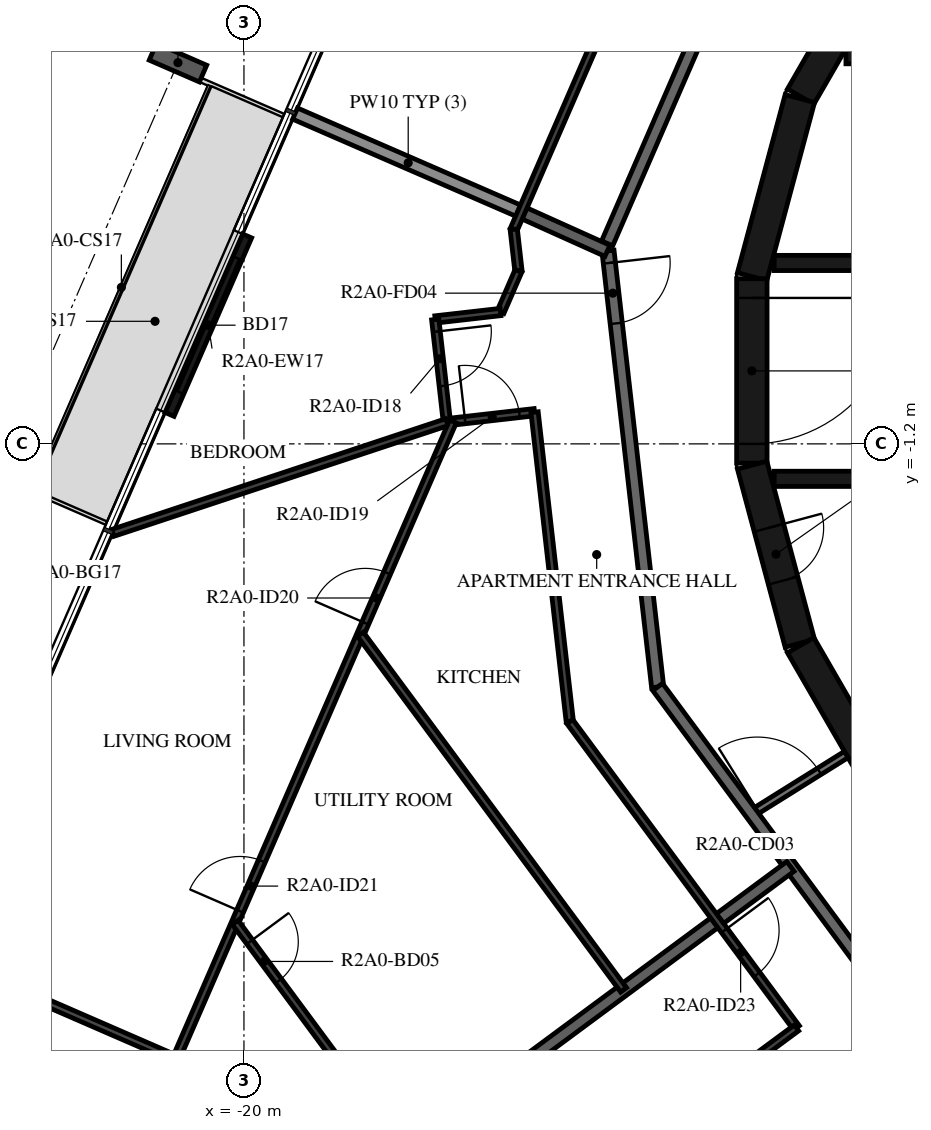
"""IFC4 building model, lengths in metres.
Left out: names, types, materials, properties, quantities, classifications, styles, units other than length and angle.
Written with IfcOpenShell. Run it as: python <this file> out.ifc"""

import sys

from ifc_helpers import new_model, si_unit, direction, frame, frame_2d, origin, origin_2d, place, context, subcontext, project, spatial, rectangle, i_section, extrude, element, fill, save


model = new_model("IFC4")
c1 = context("Model", 3, precision=1e-05, world=origin(), true_north=direction((0.0, 1.0)))
c2 = subcontext(c1, "Body", "Model", "MODEL_VIEW")
j1 = project(units=[si_unit("LENGTHUNIT", "METRE"), si_unit("PLANEANGLEUNIT", "RADIAN")], contexts=[c1])
p1 = place(None, origin())
s1 = spatial("IfcSite", under=j1, at=p1, CompositionType="ELEMENT")
p2 = place(p1, origin())
s2 = spatial("IfcBuilding", under=s1, at=p2, CompositionType="ELEMENT")
p3 = place(p2, frame((0.0, 0.0, 83.7)))
s3 = spatial("IfcBuildingStorey", under=s2, at=p3, CompositionType="ELEMENT", Elevation=83.7)
p4 = place(p3, frame((-21.085, 5.069, -0.38), z_axis=(0.0, 0.0, 1.0), x_axis=(0.398749038162, 0.917060087761, 0.0)))
e1 = element("IfcColumn", 1, at=p4, inside=s3, PredefinedType="COLUMN", context=c2, shape_type="SweptSolid", body=[
    extrude(i_section(OverallWidth=0.3, OverallDepth=0.9, WebThickness=0.019, FlangeThickness=0.035, FilletRadius=0.03, at=origin_2d()), origin(), (0.0, 0.0, 1.0), 3.5),
])
p5 = place(p3, frame((-19.947, 2.219, 0.0), z_axis=(0.0, 0.0, 1.0), x_axis=(-0.398784695066, -0.917044582876, 0.0)))
e2 = element("IfcWall", 2, at=p5, inside=s3, PredefinedType="STANDARD", context=c2, shape_type="SweptSolid", body=[
    extrude(rectangle(XDim=3.2, YDim=0.16, at=frame_2d((1.6, 0.0))), origin(), (0.0, 0.0, 1.0), 3.12),
])
p6 = place(p5, frame((0.4, 0.0, 0.0)))
e3 = element("IfcOpeningElement", 3, at=p6, cuts=e2, PredefinedType="OPENING", context=c2, shape_type="SweptSolid", body=[
    extrude(rectangle(XDim=2.4, YDim=2.4, at=frame_2d((1.2, 1.2))), frame((0.0, 0.09, 0.0), z_axis=(0.0, -1.0, 0.0), x_axis=(1.0, 0.0, 0.0)), (0.0, 0.0, 1.0), 0.18),
])
for number, where, z_axis, x_axis in (
    (4, (-9.329, 7.137, 0.0), (0.0, 0.0, 1.0), (-0.5, -0.866, 0.0)),
    (5, (-10.858, 4.479, 0.0), (0.0, 0.0, 1.0), (-0.259, -0.966, 0.0)),
):
    element("IfcWall", number, at=place(p3, frame(where, z_axis=z_axis, x_axis=x_axis)), inside=s3, PredefinedType="SHEAR", context=c2, shape_type="SweptSolid", body=[
        extrude(rectangle(XDim=3.033, YDim=0.5, at=frame_2d((1.516, 0.0))), origin(), (0.0, 0.0, 1.0), 3.12),
    ])
p7 = place(p3, frame((-11.647, 1.516, 0.0), z_axis=(0.0, 0.0, 1.0), x_axis=(0.0, -1.0, 0.0)))
e6 = element("IfcWall", 6, at=p7, inside=s3, PredefinedType="SHEAR", context=c2, shape_type="SweptSolid", body=[
    extrude(rectangle(XDim=3.033, YDim=0.5, at=frame_2d((1.516, 0.0))), origin(), (0.0, 0.0, 1.0), 3.12),
])
p8 = place(p7, frame((0.316, 0.0, 0.0)))
e7 = element("IfcOpeningElement", 7, at=p8, cuts=e6, PredefinedType="OPENING", context=c2, shape_type="SweptSolid", body=[
    extrude(rectangle(XDim=2.4, YDim=2.1, at=frame_2d((1.2, 1.05))), frame((0.0, 0.26, 0.0), z_axis=(0.0, -1.0, 0.0), x_axis=(1.0, 0.0, 0.0)), (0.0, 0.0, 1.0), 0.52),
])
p9 = place(p3, frame((-11.643, -1.55, 0.0), z_axis=(0.0, 0.0, 1.0), x_axis=(0.258734743916, -0.965948410781, 0.0)))
e8 = element("IfcWall", 8, at=p9, inside=s3, PredefinedType="SHEAR", context=c2, shape_type="SweptSolid", body=[
    extrude(rectangle(XDim=3.033, YDim=0.5, at=frame_2d((1.516, 0.0))), origin(), (0.0, 0.0, 1.0), 3.12),
])
p10 = place(p9, frame((1.066, 0.0, 0.0)))
e9 = element("IfcOpeningElement", 9, at=p10, cuts=e8, PredefinedType="OPENING", context=c2, shape_type="SweptSolid", body=[
    extrude(rectangle(XDim=0.9, YDim=2.1, at=frame_2d((0.45, 1.05))), frame((0.0, 0.26, 0.0), z_axis=(0.0, -1.0, 0.0), x_axis=(1.0, 0.0, 0.0)), (0.0, 0.0, 1.0), 0.52),
])
p11 = place(p3, frame((-10.845, -4.51, 0.0), z_axis=(0.0, 0.0, 1.0), x_axis=(0.500087131594, -0.865975092491, 0.0)))
e10 = element("IfcWall", 10, at=p11, inside=s3, PredefinedType="SHEAR", context=c2, shape_type="SweptSolid", body=[
    extrude(rectangle(XDim=3.033, YDim=0.5, at=frame_2d((1.516, 0.0))), origin(), (0.0, 0.0, 1.0), 3.12),
])
p12 = place(p3, frame((-7.0, 5.175, 0.0), z_axis=(0.0, 0.0, 1.0), x_axis=(-1.0, 0.0, 0.0)))
e11 = element("IfcWall", 11, at=p12, inside=s3, PredefinedType="SHEAR", context=c2, shape_type="SweptSolid", body=[
    extrude(rectangle(XDim=3.1, YDim=0.25, at=frame_2d((1.55, 0.0))), origin(), (0.0, 0.0, 1.0), 3.12),
])
p13 = place(p3, frame((-11.28, 1.775, 0.0), z_axis=(0.0, 0.0, 1.0), x_axis=(1.0, 0.0, 0.0)))
e12 = element("IfcWall", 12, at=p13, inside=s3, PredefinedType="SHEAR", context=c2, shape_type="SweptSolid", body=[
    extrude(rectangle(XDim=14.38, YDim=0.25, at=frame_2d((7.19, 0.0))), origin(), (0.0, 0.0, 1.0), 3.12),
])
p14 = place(p13, frame((2.13, 0.0, 0.0)))
e13 = element("IfcOpeningElement", 13, at=p14, cuts=e12, PredefinedType="OPENING", context=c2, shape_type="SweptSolid", body=[
    extrude(rectangle(XDim=1.1, YDim=2.1, at=frame_2d((0.55, 1.05))), frame((0.0, 0.135, 0.0), z_axis=(0.0, -1.0, 0.0), x_axis=(1.0, 0.0, 0.0)), (0.0, 0.0, 1.0), 0.27),
])
p15 = place(p13, frame((4.28, 0.0, 0.0)))
e14 = element("IfcOpeningElement", 14, at=p15, cuts=e12, PredefinedType="OPENING", context=c2, shape_type="SweptSolid", body=[
    extrude(rectangle(XDim=1.1, YDim=2.1, at=frame_2d((0.55, 1.05))), frame((0.0, 0.135, 0.0), z_axis=(0.0, -1.0, 0.0), x_axis=(1.0, 0.0, 0.0)), (0.0, 0.0, 1.0), 0.27),
])
p16 = place(p13, frame((6.43, 0.0, 0.0)))
e15 = element("IfcOpeningElement", 15, at=p16, cuts=e12, PredefinedType="OPENING", context=c2, shape_type="SweptSolid", body=[
    extrude(rectangle(XDim=1.1, YDim=2.1, at=frame_2d((0.55, 1.05))), frame((0.0, 0.135, 0.0), z_axis=(0.0, -1.0, 0.0), x_axis=(1.0, 0.0, 0.0)), (0.0, 0.0, 1.0), 0.27),
])
p17 = place(p13, frame((8.58, 0.0, 0.0)))
e16 = element("IfcOpeningElement", 16, at=p17, cuts=e12, PredefinedType="OPENING", context=c2, shape_type="SweptSolid", body=[
    extrude(rectangle(XDim=1.1, YDim=2.1, at=frame_2d((0.55, 1.05))), frame((0.0, 0.135, 0.0), z_axis=(0.0, -1.0, 0.0), x_axis=(1.0, 0.0, 0.0)), (0.0, 0.0, 1.0), 0.27),
])
p18 = place(p13, frame((11.905, 0.0, 0.0)))
e17 = element("IfcOpeningElement", 17, at=p18, cuts=e12, PredefinedType="OPENING", context=c2, shape_type="SweptSolid", body=[
    extrude(rectangle(XDim=0.9, YDim=2.1, at=frame_2d((0.45, 1.05))), frame((0.0, 0.135, 0.0), z_axis=(0.0, -1.0, 0.0), x_axis=(1.0, 0.0, 0.0)), (0.0, 0.0, 1.0), 0.27),
])
p19 = place(p3, frame((-11.28, -1.775, 0.0), z_axis=(0.0, 0.0, 1.0), x_axis=(1.0, 0.0, 0.0)))
e18 = element("IfcWall", 18, at=p19, inside=s3, PredefinedType="SHEAR", context=c2, shape_type="SweptSolid", body=[
    extrude(rectangle(XDim=14.38, YDim=0.25, at=frame_2d((7.19, 0.0))), origin(), (0.0, 0.0, 1.0), 3.12),
])
p20 = place(p19, frame((7.605, 0.0, 0.0)))
e19 = element("IfcOpeningElement", 19, at=p20, cuts=e18, PredefinedType="OPENING", context=c2, shape_type="SweptSolid", body=[
    extrude(rectangle(XDim=0.9, YDim=2.1, at=frame_2d((0.45, 1.05))), frame((0.0, 0.135, 0.0), z_axis=(0.0, -1.0, 0.0), x_axis=(1.0, 0.0, 0.0)), (0.0, 0.0, 1.0), 0.27),
])
p21 = place(p19, frame((10.83, 0.0, 0.0)))
e20 = element("IfcOpeningElement", 20, at=p21, cuts=e18, PredefinedType="OPENING", context=c2, shape_type="SweptSolid", body=[
    extrude(rectangle(XDim=0.9, YDim=2.1, at=frame_2d((0.45, 1.05))), frame((0.0, 0.135, 0.0), z_axis=(0.0, -1.0, 0.0), x_axis=(1.0, 0.0, 0.0)), (0.0, 0.0, 1.0), 0.27),
])
p22 = place(p19, frame((12.98, 0.0, 0.0)))
e21 = element("IfcOpeningElement", 21, at=p22, cuts=e18, PredefinedType="OPENING", context=c2, shape_type="SweptSolid", body=[
    extrude(rectangle(XDim=0.9, YDim=2.1, at=frame_2d((0.45, 1.05))), frame((0.0, 0.135, 0.0), z_axis=(0.0, -1.0, 0.0), x_axis=(1.0, 0.0, 0.0)), (0.0, 0.0, 1.0), 0.27),
])
p23 = place(p3, frame((-11.654, -7.282, 0.0), z_axis=(0.0, 0.0, 1.0), x_axis=(0.848117698675, 0.529807860638, 0.0)))
e22 = element("IfcWall", 22, at=p23, inside=s3, PredefinedType="PARTITIONING", context=c2, shape_type="SweptSolid", body=[
    extrude(rectangle(XDim=1.838, YDim=0.12, at=frame_2d((0.919, 0.0))), origin(), (0.0, 0.0, 1.0), 3.12),
])
p24 = place(p23, frame((0.115, 0.0, 0.0)))
e23 = element("IfcOpeningElement", 23, at=p24, cuts=e22, PredefinedType="OPENING", context=c2, shape_type="SweptSolid", body=[
    extrude(rectangle(XDim=1.2, YDim=2.1, at=frame_2d((0.6, 1.05))), frame((0.0, 0.07, 0.0), z_axis=(0.0, -1.0, 0.0), x_axis=(1.0, 0.0, 0.0)), (0.0, 0.0, 1.0), 0.14),
])
p25 = place(p3, frame((-11.1, 8.829, 0.0), z_axis=(0.0, 0.0, 1.0), x_axis=(-0.398741918631, -0.917063183388, 0.0)))
e24 = element("IfcWall", 24, at=p25, inside=s3, PredefinedType="STANDARD", context=c2, shape_type="SweptSolid", body=[
    extrude(rectangle(XDim=7.342, YDim=0.2, at=frame_2d((3.671, 0.0))), origin(), (0.0, 0.0, 1.0), 3.12),
])
p26 = place(p3, frame((-14.013, 1.974, 0.0), z_axis=(0.0, 0.0, 1.0), x_axis=(0.113196526349, -0.993572617589, 0.0)))
e25 = element("IfcWall", 25, at=p26, inside=s3, PredefinedType="STANDARD", context=c2, shape_type="SweptSolid", body=[
    extrude(rectangle(XDim=7.219, YDim=0.2, at=frame_2d((3.609, 0.0))), origin(), (0.0, 0.0, 1.0), 3.12),
])
p27 = place(p26, frame((0.2, 0.0, 0.0)))
e26 = element("IfcOpeningElement", 26, at=p27, cuts=e25, PredefinedType="OPENING", context=c2, shape_type="SweptSolid", body=[
    extrude(rectangle(XDim=1.0, YDim=2.1, at=frame_2d((0.5, 1.05))), frame((0.0, 0.11, 0.0), z_axis=(0.0, -1.0, 0.0), x_axis=(1.0, 0.0, 0.0)), (0.0, 0.0, 1.0), 0.22),
])
p28 = place(p3, frame((-13.196, -5.198, 0.0), z_axis=(0.0, 0.0, 1.0), x_axis=(0.594805187394, -0.803869883159, 0.0)))
e27 = element("IfcWall", 27, at=p28, inside=s3, PredefinedType="STANDARD", context=c2, shape_type="SweptSolid", body=[
    extrude(rectangle(XDim=7.342, YDim=0.2, at=frame_2d((3.671, 0.0))), origin(), (0.0, 0.0, 1.0), 3.12),
])
p29 = place(p3, frame((-15.439, 2.613, 0.0), z_axis=(0.0, 0.0, 1.0), x_axis=(0.911830308819, -0.410567275752, 0.0)))
e28 = element("IfcWall", 28, at=p29, inside=s3, PredefinedType="STANDARD", context=c2, shape_type="SweptSolid", body=[
    extrude(rectangle(XDim=1.553, YDim=0.2, at=frame_2d((0.777, 0.0))), origin(), (0.0, 0.0, 1.0), 3.12),
])
p30 = place(p3, frame((-19.159, 4.231, 0.0), z_axis=(0.0, 0.0, 1.0), x_axis=(0.91704996524, -0.398772317562, 0.0)))
e29 = element("IfcWall", 29, at=p30, inside=s3, PredefinedType="STANDARD", context=c2, shape_type="SweptSolid", body=[
    extrude(rectangle(XDim=4.057, YDim=0.2, at=frame_2d((2.029, 0.0))), origin(), (0.0, 0.0, 1.0), 2.73),
])
p31 = place(p3, frame((-15.41, -11.403, 0.0), z_axis=(0.0, 0.0, 1.0), x_axis=(0.803887568227, 0.594781285558, 0.0)))
e30 = element("IfcWall", 30, at=p31, inside=s3, PredefinedType="STANDARD", context=c2, shape_type="SweptSolid", body=[
    extrude(rectangle(XDim=5.47, YDim=0.2, at=frame_2d((2.735, 0.0))), origin(), (0.0, 0.0, 1.0), 3.12),
])
p32 = place(p3, frame((-14.049, 5.81, 0.0), z_axis=(0.0, 0.0, 1.0), x_axis=(-0.398707311688, -0.917078229818, 0.0)))
e31 = element("IfcWall", 31, at=p32, inside=s3, PredefinedType="PARTITIONING", context=c2, shape_type="SweptSolid", body=[
    extrude(rectangle(XDim=3.799, YDim=0.12, at=frame_2d((1.899, 0.0))), origin(), (0.0, 0.0, 1.0), 3.12),
])
p33 = place(p3, frame((-15.563, 2.326, 0.0), z_axis=(0.0, 0.0, 1.0), x_axis=(0.113013677091, -0.993593432341, 0.0)))
e32 = element("IfcWall", 32, at=p33, inside=s3, PredefinedType="PARTITIONING", context=c2, shape_type="SweptSolid", body=[
    extrude(rectangle(XDim=0.685, YDim=0.12, at=frame_2d((0.342, 0.0))), origin(), (0.0, 0.0, 1.0), 3.12),
])
p34 = place(p3, frame((-15.486, 1.646, 0.0), z_axis=(0.0, 0.0, 1.0), x_axis=(-0.398701933952, -0.917080567814, 0.0)))
e33 = element("IfcWall", 33, at=p34, inside=s3, PredefinedType="PARTITIONING", context=c2, shape_type="SweptSolid", body=[
    extrude(rectangle(XDim=0.739, YDim=0.12, at=frame_2d((0.369, 0.0))), origin(), (0.0, 0.0, 1.0), 3.12),
])
p35 = place(p3, frame((-15.78, 0.968, 0.0), z_axis=(0.0, 0.0, 1.0), x_axis=(-0.99355448905, -0.113355534887, 0.0)))
e34 = element("IfcWall", 34, at=p35, inside=s3, PredefinedType="PARTITIONING", context=c2, shape_type="SweptSolid", body=[
    extrude(rectangle(XDim=1.081, YDim=0.12, at=frame_2d((0.541, 0.0))), origin(), (0.0, 0.0, 1.0), 3.12),
])
p36 = place(p3, frame((-16.854, 0.846, 0.0), z_axis=(0.0, 0.0, 1.0), x_axis=(0.113173930474, -0.993575191649, 0.0)))
e35 = element("IfcWall", 35, at=p36, inside=s3, PredefinedType="PARTITIONING", context=c2, shape_type="SweptSolid", body=[
    extrude(rectangle(XDim=1.7, YDim=0.12, at=frame_2d((0.85, 0.0))), origin(), (0.0, 0.0, 1.0), 3.12),
])
p37 = place(p36, frame((0.2, 0.0, 0.0)))
e36 = element("IfcOpeningElement", 36, at=p37, cuts=e35, PredefinedType="OPENING", context=c2, shape_type="SweptSolid", body=[
    extrude(rectangle(XDim=0.9, YDim=2.1, at=frame_2d((0.45, 1.05))), frame((0.0, 0.07, 0.0), z_axis=(0.0, -1.0, 0.0), x_axis=(1.0, 0.0, 0.0)), (0.0, 0.0, 1.0), 0.14),
])
p38 = place(p3, frame((-16.563, -0.832, 0.0), z_axis=(0.0, 0.0, 1.0), x_axis=(0.993578035261, 0.113148963084, 0.0)))
e37 = element("IfcWall", 37, at=p38, inside=s3, PredefinedType="PARTITIONING", context=c2, shape_type="SweptSolid", body=[
    extrude(rectangle(XDim=1.351, YDim=0.12, at=frame_2d((0.675, 0.0))), origin(), (0.0, 0.0, 1.0), 3.12),
])
p39 = place(p38, frame((0.2, 0.0, 0.0)))
e38 = element("IfcOpeningElement", 38, at=p39, cuts=e37, PredefinedType="OPENING", context=c2, shape_type="SweptSolid", body=[
    extrude(rectangle(XDim=0.9, YDim=2.1, at=frame_2d((0.45, 1.05))), frame((0.0, 0.07, 0.0), z_axis=(0.0, -1.0, 0.0), x_axis=(1.0, 0.0, 0.0)), (0.0, 0.0, 1.0), 0.14),
])
p40 = place(p3, frame((-15.221, -0.679, 0.0), z_axis=(0.0, 0.0, 1.0), x_axis=(0.113219875647, -0.993569957154, 0.0)))
e39 = element("IfcWall", 39, at=p40, inside=s3, PredefinedType="PARTITIONING", context=c2, shape_type="SweptSolid", body=[
    extrude(rectangle(XDim=5.121, YDim=0.12, at=frame_2d((2.561, 0.0))), origin(), (0.0, 0.0, 1.0), 3.12),
])
p41 = place(p3, frame((-14.641, -5.767, 0.0), z_axis=(0.0, 0.0, 1.0), x_axis=(0.594825885962, -0.803854567313, 0.0)))
e40 = element("IfcWall", 40, at=p41, inside=s3, PredefinedType="PARTITIONING", context=c2, shape_type="SweptSolid", body=[
    extrude(rectangle(XDim=6.266, YDim=0.12, at=frame_2d((3.133, 0.0))), origin(), (0.0, 0.0, 1.0), 3.12),
])
p42 = place(p41, frame((4.273, 0.0, 0.0)))
e41 = element("IfcOpeningElement", 41, at=p42, cuts=e40, PredefinedType="OPENING", context=c2, shape_type="SweptSolid", body=[
    extrude(rectangle(XDim=0.9, YDim=2.1, at=frame_2d((0.45, 1.05))), frame((0.0, 0.07, 0.0), z_axis=(0.0, -1.0, 0.0), x_axis=(1.0, 0.0, 0.0)), (0.0, 0.0, 1.0), 0.14),
])
p43 = place(p3, frame((-22.157, -2.664, 0.0), z_axis=(0.0, 0.0, 1.0), x_axis=(0.949263673698, 0.314481283698, 0.0)))
e42 = element("IfcWall", 42, at=p43, inside=s3, PredefinedType="PARTITIONING", context=c2, shape_type="SweptSolid", body=[
    extrude(rectangle(XDim=5.789, YDim=0.12, at=frame_2d((2.895, 0.0))), origin(), (0.0, 0.0, 1.0), 3.12),
])
p44 = place(p3, frame((-21.298, -11.722, 0.0), z_axis=(0.0, 0.0, 1.0), x_axis=(0.398737387658, 0.917065153456, 0.0)))
e43 = element("IfcWall", 43, at=p44, inside=s3, PredefinedType="PARTITIONING", context=c2, shape_type="SweptSolid", body=[
    extrude(rectangle(XDim=11.875, YDim=0.12, at=frame_2d((5.938, 0.0))), origin(), (0.0, 0.0, 1.0), 3.12),
])
p45 = place(p44, frame((8.26, 0.0, 0.0)))
e44 = element("IfcOpeningElement", 44, at=p45, cuts=e43, PredefinedType="OPENING", context=c2, shape_type="SweptSolid", body=[
    extrude(rectangle(XDim=0.9, YDim=2.1, at=frame_2d((0.45, 1.05))), frame((0.0, 0.07, 0.0), z_axis=(0.0, -1.0, 0.0), x_axis=(1.0, 0.0, 0.0)), (0.0, 0.0, 1.0), 0.14),
])
p46 = place(p44, frame((3.094, 0.0, 0.0)))
e45 = element("IfcOpeningElement", 45, at=p46, cuts=e43, PredefinedType="OPENING", context=c2, shape_type="SweptSolid", body=[
    extrude(rectangle(XDim=0.9, YDim=2.1, at=frame_2d((0.45, 1.05))), frame((0.0, 0.07, 0.0), z_axis=(0.0, -1.0, 0.0), x_axis=(1.0, 0.0, 0.0)), (0.0, 0.0, 1.0), 0.14),
])
p47 = place(p3, frame((-25.156, -9.559, 0.0), z_axis=(0.0, 0.0, 1.0), x_axis=(0.917042707292, -0.398789008127, 0.0)))
e46 = element("IfcWall", 46, at=p47, inside=s3, PredefinedType="PARTITIONING", context=c2, shape_type="SweptSolid", body=[
    extrude(rectangle(XDim=4.4, YDim=0.12, at=frame_2d((2.2, 0.0))), origin(), (0.0, 0.0, 1.0), 2.73),
])
p48 = place(p47, frame((0.2, 0.0, 0.0)))
e47 = element("IfcOpeningElement", 47, at=p48, cuts=e46, PredefinedType="OPENING", context=c2, shape_type="SweptSolid", body=[
    extrude(rectangle(XDim=0.9, YDim=2.1, at=frame_2d((0.45, 1.05))), frame((0.0, 0.07, 0.0), z_axis=(0.0, -1.0, 0.0), x_axis=(1.0, 0.0, 0.0)), (0.0, 0.0, 1.0), 0.14),
])
p49 = place(p3, frame((-18.084, -4.331, 0.0), z_axis=(0.0, 0.0, 1.0), x_axis=(0.594811782108, -0.803865003508, 0.0)))
e48 = element("IfcWall", 48, at=p49, inside=s3, PredefinedType="PARTITIONING", context=c2, shape_type="SweptSolid", body=[
    extrude(rectangle(XDim=7.276, YDim=0.12, at=frame_2d((3.638, 0.0))), origin(), (0.0, 0.0, 1.0), 3.12),
])
p50 = place(p3, frame((-20.144, -9.068, 0.0), z_axis=(0.0, 0.0, 1.0), x_axis=(0.59487477233, -0.803818390711, 0.0)))
e49 = element("IfcWall", 49, at=p50, inside=s3, PredefinedType="PARTITIONING", context=c2, shape_type="SweptSolid", body=[
    extrude(rectangle(XDim=3.575, YDim=0.12, at=frame_2d((1.788, 0.0))), origin(), (0.0, 0.0, 1.0), 3.12),
])
p51 = place(p50, frame((0.4, 0.0, 0.0)))
e50 = element("IfcOpeningElement", 50, at=p51, cuts=e49, PredefinedType="OPENING", context=c2, shape_type="SweptSolid", body=[
    extrude(rectangle(XDim=0.8, YDim=2.1, at=frame_2d((0.4, 1.05))), frame((0.0, 0.07, 0.0), z_axis=(0.0, -1.0, 0.0), x_axis=(1.0, 0.0, 0.0)), (0.0, 0.0, 1.0), 0.14),
])
p52 = place(p3, frame((-10.914, -10.804, 0.0), z_axis=(0.0, 0.0, 1.0), x_axis=(-0.803864616889, -0.594812304609, 0.0)))
e51 = element("IfcWall", 51, at=p52, inside=s3, PredefinedType="PARTITIONING", context=c2, shape_type="SweptSolid", body=[
    extrude(rectangle(XDim=4.008, YDim=0.12, at=frame_2d((2.004, 0.0))), origin(), (0.0, 0.0, 1.0), 3.12),
])
p53 = place(p6, origin())
e52 = element("IfcDoor", 52, at=p53, inside=s3, OperationType="DOUBLE_DOOR_SLIDING", PredefinedType="DOOR", context=c2, shape_type="SweptSolid", body=[
    extrude(rectangle(XDim=2.4, YDim=2.4, at=frame_2d((1.2, 1.2))), frame((0.0, 0.025, 0.0), z_axis=(0.0, -1.0, 0.0), x_axis=(1.0, 0.0, 0.0)), (0.0, 0.0, 1.0), 0.05),
])
fill(e3, e52)
p54 = place(p8, origin())
e53 = element("IfcDoor", 53, at=p54, inside=s3, OperationType="DOUBLE_DOOR_SINGLE_SWING", PredefinedType="DOOR", context=c2, shape_type="SweptSolid", body=[
    extrude(rectangle(XDim=2.4, YDim=2.1, at=frame_2d((1.2, 1.05))), frame((0.0, 0.025, 0.0), z_axis=(0.0, -1.0, 0.0), x_axis=(1.0, 0.0, 0.0)), (0.0, 0.0, 1.0), 0.05),
])
fill(e7, e53)
p55 = place(p10, origin())
e54 = element("IfcDoor", 54, at=p55, inside=s3, OperationType="SINGLE_SWING_LEFT", PredefinedType="DOOR", context=c2, shape_type="SweptSolid", body=[
    extrude(rectangle(XDim=0.9, YDim=2.1, at=frame_2d((0.45, 1.05))), frame((0.0, 0.025, 0.0), z_axis=(0.0, -1.0, 0.0), x_axis=(1.0, 0.0, 0.0)), (0.0, 0.0, 1.0), 0.05),
])
fill(e9, e54)
p56 = place(p27, origin())
e55 = element("IfcDoor", 55, at=p56, inside=s3, OperationType="SINGLE_SWING_RIGHT", PredefinedType="DOOR", context=c2, shape_type="SweptSolid", body=[
    extrude(rectangle(XDim=1.0, YDim=2.1, at=frame_2d((0.5, 1.05))), frame((0.0, 0.025, 0.0), z_axis=(0.0, -1.0, 0.0), x_axis=(1.0, 0.0, 0.0)), (0.0, 0.0, 1.0), 0.05),
])
fill(e26, e55)
p57 = place(p37, origin())
e56 = element("IfcDoor", 56, at=p57, inside=s3, OperationType="SINGLE_SWING_RIGHT", PredefinedType="DOOR", context=c2, shape_type="SweptSolid", body=[
    extrude(rectangle(XDim=0.9, YDim=2.1, at=frame_2d((0.45, 1.05))), frame((0.0, 0.025, 0.0), z_axis=(0.0, -1.0, 0.0), x_axis=(1.0, 0.0, 0.0)), (0.0, 0.0, 1.0), 0.05),
])
fill(e36, e56)
p58 = place(p39, origin())
e57 = element("IfcDoor", 57, at=p58, inside=s3, OperationType="SINGLE_SWING_LEFT", PredefinedType="DOOR", context=c2, shape_type="SweptSolid", body=[
    extrude(rectangle(XDim=0.9, YDim=2.1, at=frame_2d((0.45, 1.05))), frame((0.0, 0.025, 0.0), z_axis=(0.0, -1.0, 0.0), x_axis=(1.0, 0.0, 0.0)), (0.0, 0.0, 1.0), 0.05),
])
fill(e38, e57)
p59 = place(p45, origin())
e58 = element("IfcDoor", 58, at=p59, inside=s3, OperationType="SINGLE_SWING_RIGHT", PredefinedType="DOOR", context=c2, shape_type="SweptSolid", body=[
    extrude(rectangle(XDim=0.9, YDim=2.1, at=frame_2d((0.45, 1.05))), frame((0.0, 0.025, 0.0), z_axis=(0.0, -1.0, 0.0), x_axis=(1.0, 0.0, 0.0)), (0.0, 0.0, 1.0), 0.05),
])
fill(e44, e58)
p60 = place(p46, origin())
e59 = element("IfcDoor", 59, at=p60, inside=s3, OperationType="SINGLE_SWING_LEFT", PredefinedType="DOOR", context=c2, shape_type="SweptSolid", body=[
    extrude(rectangle(XDim=0.9, YDim=2.1, at=frame_2d((0.45, 1.05))), frame((0.0, 0.025, 0.0), z_axis=(0.0, -1.0, 0.0), x_axis=(1.0, 0.0, 0.0)), (0.0, 0.0, 1.0), 0.05),
])
fill(e45, e59)
p61 = place(p51, origin())
e60 = element("IfcDoor", 60, at=p61, inside=s3, OperationType="SINGLE_SWING_RIGHT", PredefinedType="DOOR", context=c2, shape_type="SweptSolid", body=[
    extrude(rectangle(XDim=0.8, YDim=2.1, at=frame_2d((0.4, 1.05))), frame((0.0, 0.025, 0.0), z_axis=(0.0, -1.0, 0.0), x_axis=(1.0, 0.0, 0.0)), (0.0, 0.0, 1.0), 0.05),
])
fill(e50, e60)
p62 = place(p42, origin())
e61 = element("IfcDoor", 61, at=p62, inside=s3, OperationType="SINGLE_SWING_LEFT", PredefinedType="DOOR", context=c2, shape_type="SweptSolid", body=[
    extrude(rectangle(XDim=0.9, YDim=2.1, at=frame_2d((0.45, 1.05))), frame((0.0, 0.025, 0.0), z_axis=(0.0, -1.0, 0.0), x_axis=(1.0, 0.0, 0.0)), (0.0, 0.0, 1.0), 0.05),
])
fill(e41, e61)
p63 = place(p24, origin())
e62 = element("IfcDoor", 62, at=p63, inside=s3, OperationType="DOUBLE_DOOR_SINGLE_SWING", PredefinedType="DOOR", context=c2, shape_type="SweptSolid", body=[
    extrude(rectangle(XDim=1.2, YDim=2.1, at=frame_2d((0.6, 1.05))), frame((0.0, 0.025, 0.0), z_axis=(0.0, -1.0, 0.0), x_axis=(1.0, 0.0, 0.0)), (0.0, 0.0, 1.0), 0.05),
])
fill(e23, e62)
save(model, sys.argv[1])
